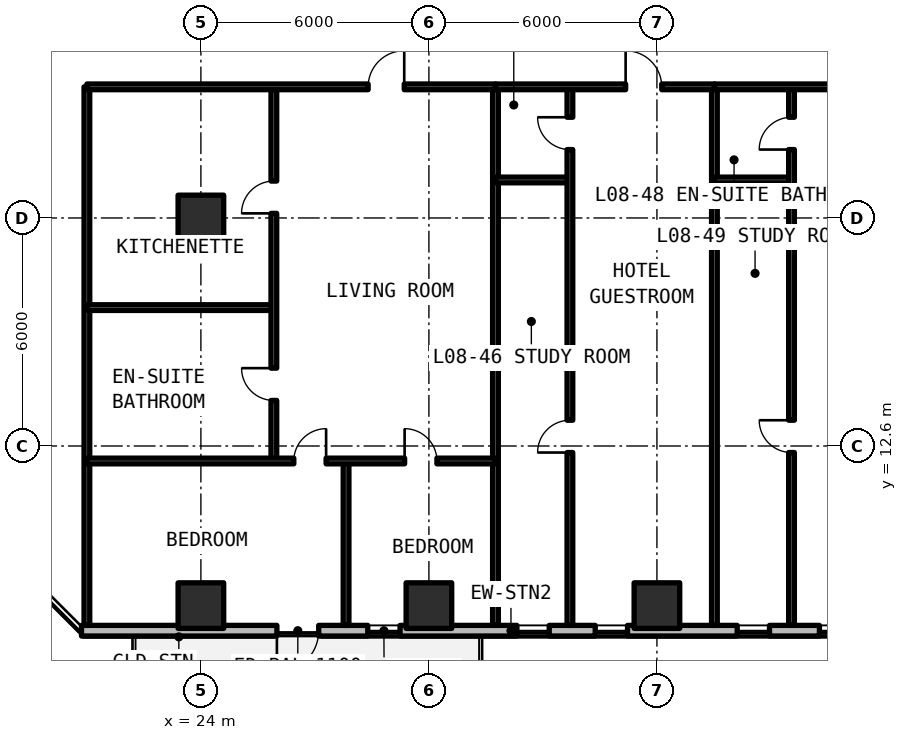
"""IFC4 building model, lengths in metres.
Left out: names, types, materials, properties, quantities, classifications, styles, units other than length and angle.
Written with IfcOpenShell. Run it as: python <this file> out.ifc"""

import sys

from ifc_helpers import new_model, si_unit, direction, frame, frame_2d, origin, origin_2d, place, context, subcontext, project, spatial, rectangle, extrude, element, fill, save


model = new_model("IFC4")
c1 = context("Model", 3, precision=1e-05, world=origin(), true_north=direction((0.0, 1.0)))
c2 = subcontext(c1, "Body", "Model", "MODEL_VIEW")
j1 = project(units=[si_unit("LENGTHUNIT", "METRE"), si_unit("PLANEANGLEUNIT", "RADIAN")], contexts=[c1])
p1 = place(None, origin())
s1 = spatial("IfcSite", under=j1, at=p1, CompositionType="ELEMENT")
p2 = place(p1, origin())
s2 = spatial("IfcBuilding", under=s1, at=p2, CompositionType="ELEMENT")
p3 = place(p2, frame((0.0, 0.0, 32.34)))
s3 = spatial("IfcBuildingStorey", under=s2, at=p3, CompositionType="ELEMENT", Elevation=32.34)
for number, where, z_axis, x_axis in (
    (1, (24.0, 18.6, 0.0), (0.0, 0.0, 1.0), (1.0, 0.0, 0.0)),
    (2, (24.0, 8.4, 0.0), (0.0, 0.0, 1.0), (1.0, 0.0, 0.0)),
    (3, (30.0, 8.4, 0.0), (0.0, 0.0, 1.0), (1.0, 0.0, 0.0)),
    (4, (36.0, 8.4, 0.0), (0.0, 0.0, 1.0), (1.0, 0.0, 0.0)),
):
    element("IfcColumn", number, at=place(p3, frame(where, z_axis=z_axis, x_axis=x_axis)), inside=s3, PredefinedType="COLUMN", context=c2, shape_type="SweptSolid", body=[
        extrude(rectangle(XDim=1.2, YDim=1.2, at=origin_2d()), origin(), (0.0, 0.0, 1.0), 3.3),
    ])
p4 = place(p3, frame((20.858, 7.74, 0.0), z_axis=(0.0, 0.0, 1.0), x_axis=(1.0, 0.0, 0.0)))
e5 = element("IfcWall", 5, at=p4, inside=s3, PredefinedType="SOLIDWALL", context=c2, shape_type="SweptSolid", body=[
    extrude(rectangle(XDim=22.602, YDim=0.28, at=frame_2d((11.301, 0.0))), origin(), (0.0, 0.0, 1.0), 3.08),
])
p5 = place(p4, frame((5.142, 0.0, 0.0)))
e6 = element("IfcOpeningElement", 6, at=p5, cuts=e5, PredefinedType="OPENING", context=c2, shape_type="SweptSolid", body=[
    extrude(rectangle(XDim=1.1, YDim=2.15, at=frame_2d((0.55, 1.075))), frame((0.0, 0.15, 0.0), z_axis=(0.0, -1.0, 0.0), x_axis=(1.0, 0.0, 0.0)), (0.0, 0.0, 1.0), 0.3),
])
p6 = place(p4, frame((7.533, 0.0, 0.78)))
e7 = element("IfcOpeningElement", 7, at=p6, cuts=e5, PredefinedType="OPENING", context=c2, shape_type="SweptSolid", body=[
    extrude(rectangle(XDim=0.85, YDim=1.65, at=frame_2d((0.425, 0.825))), frame((0.0, 0.15, 0.0), z_axis=(0.0, -1.0, 0.0), x_axis=(1.0, 0.0, 0.0)), (0.0, 0.0, 1.0), 0.3),
])
p7 = place(p4, frame((11.458, 0.0, 0.78)))
e8 = element("IfcOpeningElement", 8, at=p7, cuts=e5, PredefinedType="OPENING", context=c2, shape_type="SweptSolid", body=[
    extrude(rectangle(XDim=0.85, YDim=1.65, at=frame_2d((0.425, 0.825))), frame((0.0, 0.15, 0.0), z_axis=(0.0, -1.0, 0.0), x_axis=(1.0, 0.0, 0.0)), (0.0, 0.0, 1.0), 0.3),
])
p8 = place(p4, frame((13.519, 0.0, 0.78)))
e9 = element("IfcOpeningElement", 9, at=p8, cuts=e5, PredefinedType="OPENING", context=c2, shape_type="SweptSolid", body=[
    extrude(rectangle(XDim=0.85, YDim=1.65, at=frame_2d((0.425, 0.825))), frame((0.0, 0.15, 0.0), z_axis=(0.0, -1.0, 0.0), x_axis=(1.0, 0.0, 0.0)), (0.0, 0.0, 1.0), 0.3),
])
p9 = place(p4, frame((17.254, 0.0, 0.78)))
e10 = element("IfcOpeningElement", 10, at=p9, cuts=e5, PredefinedType="OPENING", context=c2, shape_type="SweptSolid", body=[
    extrude(rectangle(XDim=0.85, YDim=1.65, at=frame_2d((0.425, 0.825))), frame((0.0, 0.15, 0.0), z_axis=(0.0, -1.0, 0.0), x_axis=(1.0, 0.0, 0.0)), (0.0, 0.0, 1.0), 0.3),
])
p10 = place(p4, frame((19.418, 0.0, 0.78)))
e11 = element("IfcOpeningElement", 11, at=p10, cuts=e5, PredefinedType="OPENING", context=c2, shape_type="SweptSolid", body=[
    extrude(rectangle(XDim=0.85, YDim=1.65, at=frame_2d((0.425, 0.825))), frame((0.0, 0.15, 0.0), z_axis=(0.0, -1.0, 0.0), x_axis=(1.0, 0.0, 0.0)), (0.0, 0.0, 1.0), 0.3),
])
for number, where, z_axis, x_axis in (
    (12, (21.0, 7.88, 0.0), (0.0, 0.0, 1.0), (0.0, 1.0, 0.0)),
    (13, (31.751, 7.88, 0.0), (0.0, 0.0, 1.0), (0.0, 1.0, 0.0)),
):
    element("IfcWall", number, at=place(p3, frame(where, z_axis=z_axis, x_axis=x_axis)), inside=s3, PredefinedType="SOLIDWALL", context=c2, shape_type="SweptSolid", body=[
        extrude(rectangle(XDim=14.17, YDim=0.15, at=frame_2d((7.085, 0.0))), origin(), (0.0, 0.0, 1.0), 2.35),
    ])
p11 = place(p3, frame((21.0, 16.242, 0.0), z_axis=(0.0, 0.0, 1.0), x_axis=(1.0, 0.0, 0.0)))
e14 = element("IfcWall", 14, at=p11, inside=s3, PredefinedType="PARTITIONING", context=c2, shape_type="SweptSolid", body=[
    extrude(rectangle(XDim=4.92, YDim=0.15, at=frame_2d((2.46, 0.0))), origin(), (0.0, 0.0, 1.0), 2.35),
])
p12 = place(p3, frame((25.92, 12.206, 0.0), z_axis=(0.0, 0.0, 1.0), x_axis=(0.0, 1.0, 0.0)))
e15 = element("IfcWall", 15, at=p12, inside=s3, PredefinedType="PARTITIONING", context=c2, shape_type="SweptSolid", body=[
    extrude(rectangle(XDim=9.844, YDim=0.15, at=frame_2d((4.922, 0.0))), origin(), (0.0, 0.0, 1.0), 2.35),
])
p13 = place(p12, frame((1.593, 0.0, 0.0)))
e16 = element("IfcOpeningElement", 16, at=p13, cuts=e15, PredefinedType="OPENING", context=c2, shape_type="SweptSolid", body=[
    extrude(rectangle(XDim=0.85, YDim=2.1, at=frame_2d((0.425, 1.05))), frame((0.0, 0.085, 0.0), z_axis=(0.0, -1.0, 0.0), x_axis=(1.0, 0.0, 0.0)), (0.0, 0.0, 1.0), 0.17),
])
p14 = place(p12, frame((6.515, 0.0, 0.0)))
e17 = element("IfcOpeningElement", 17, at=p14, cuts=e15, PredefinedType="OPENING", context=c2, shape_type="SweptSolid", body=[
    extrude(rectangle(XDim=0.85, YDim=2.1, at=frame_2d((0.425, 1.05))), frame((0.0, 0.085, 0.0), z_axis=(0.0, -1.0, 0.0), x_axis=(1.0, 0.0, 0.0)), (0.0, 0.0, 1.0), 0.17),
])
p15 = place(p3, frame((27.82, 7.88, 0.0), z_axis=(0.0, 0.0, 1.0), x_axis=(0.0, 1.0, 0.0)))
e18 = element("IfcWall", 18, at=p15, inside=s3, PredefinedType="PARTITIONING", context=c2, shape_type="SweptSolid", body=[
    extrude(rectangle(XDim=4.326, YDim=0.15, at=frame_2d((2.163, 0.0))), origin(), (0.0, 0.0, 1.0), 2.35),
])
p16 = place(p3, frame((21.0, 12.206, 0.0), z_axis=(0.0, 0.0, 1.0), x_axis=(1.0, 0.0, 0.0)))
e19 = element("IfcWall", 19, at=p16, inside=s3, PredefinedType="PARTITIONING", context=c2, shape_type="SweptSolid", body=[
    extrude(rectangle(XDim=10.751, YDim=0.15, at=frame_2d((5.375, 0.0))), origin(), (0.0, 0.0, 1.0), 2.35),
])
p17 = place(p16, frame((5.445, 0.0, 0.0)))
e20 = element("IfcOpeningElement", 20, at=p17, cuts=e19, PredefinedType="OPENING", context=c2, shape_type="SweptSolid", body=[
    extrude(rectangle(XDim=0.85, YDim=2.1, at=frame_2d((0.425, 1.05))), frame((0.0, 0.085, 0.0), z_axis=(0.0, -1.0, 0.0), x_axis=(1.0, 0.0, 0.0)), (0.0, 0.0, 1.0), 0.17),
])
p18 = place(p16, frame((8.361, 0.0, 0.0)))
e21 = element("IfcOpeningElement", 21, at=p18, cuts=e19, PredefinedType="OPENING", context=c2, shape_type="SweptSolid", body=[
    extrude(rectangle(XDim=0.85, YDim=2.1, at=frame_2d((0.425, 1.05))), frame((0.0, 0.085, 0.0), z_axis=(0.0, -1.0, 0.0), x_axis=(1.0, 0.0, 0.0)), (0.0, 0.0, 1.0), 0.17),
])
p19 = place(p3, frame((21.0, 22.05, 0.0), z_axis=(0.0, 0.0, 1.0), x_axis=(1.0, 0.0, 0.0)))
e22 = element("IfcWall", 22, at=p19, inside=s3, PredefinedType="SOLIDWALL", context=c2, shape_type="SweptSolid", body=[
    extrude(rectangle(XDim=10.751, YDim=0.15, at=frame_2d((5.375, 0.0))), origin(), (0.0, 0.0, 1.0), 2.35),
])
p20 = place(p19, frame((7.401, 0.0, 0.0)))
e23 = element("IfcOpeningElement", 23, at=p20, cuts=e22, PredefinedType="OPENING", context=c2, shape_type="SweptSolid", body=[
    extrude(rectangle(XDim=0.95, YDim=2.15, at=frame_2d((0.475, 1.075))), frame((0.0, 0.085, 0.0), z_axis=(0.0, -1.0, 0.0), x_axis=(1.0, 0.0, 0.0)), (0.0, 0.0, 1.0), 0.17),
])
p21 = place(p3, frame((37.513, 7.88, 0.0), z_axis=(0.0, 0.0, 1.0), x_axis=(0.0, 1.0, 0.0)))
e24 = element("IfcWall", 24, at=p21, inside=s3, PredefinedType="SOLIDWALL", context=c2, shape_type="SweptSolid", body=[
    extrude(rectangle(XDim=14.17, YDim=0.15, at=frame_2d((7.085, 0.0))), origin(), (0.0, 0.0, 1.0), 2.35),
])
p22 = place(p3, frame((31.751, 19.6, 0.0), z_axis=(0.0, 0.0, 1.0), x_axis=(1.0, 0.0, 0.0)))
e25 = element("IfcWall", 25, at=p22, inside=s3, PredefinedType="PARTITIONING", context=c2, shape_type="SweptSolid", body=[
    extrude(rectangle(XDim=1.959, YDim=0.15, at=frame_2d((0.979, 0.0))), origin(), (0.0, 0.0, 1.0), 2.35),
])
p23 = place(p3, frame((33.71, 7.88, 0.0), z_axis=(0.0, 0.0, 1.0), x_axis=(0.0, 1.0, 0.0)))
e26 = element("IfcWall", 26, at=p23, inside=s3, PredefinedType="PARTITIONING", context=c2, shape_type="SweptSolid", body=[
    extrude(rectangle(XDim=14.17, YDim=0.15, at=frame_2d((7.085, 0.0))), origin(), (0.0, 0.0, 1.0), 2.35),
])
p24 = place(p23, frame((4.548, 0.0, 0.0)))
e27 = element("IfcOpeningElement", 27, at=p24, cuts=e26, PredefinedType="OPENING", context=c2, shape_type="SweptSolid", body=[
    extrude(rectangle(XDim=0.85, YDim=2.1, at=frame_2d((0.425, 1.05))), frame((0.0, 0.085, 0.0), z_axis=(0.0, -1.0, 0.0), x_axis=(1.0, 0.0, 0.0)), (0.0, 0.0, 1.0), 0.17),
])
p25 = place(p23, frame((12.52, 0.0, 0.0)))
e28 = element("IfcOpeningElement", 28, at=p25, cuts=e26, PredefinedType="OPENING", context=c2, shape_type="SweptSolid", body=[
    extrude(rectangle(XDim=0.85, YDim=2.1, at=frame_2d((0.425, 1.05))), frame((0.0, 0.085, 0.0), z_axis=(0.0, -1.0, 0.0), x_axis=(1.0, 0.0, 0.0)), (0.0, 0.0, 1.0), 0.17),
])
p26 = place(p3, frame((31.751, 22.05, 0.0), z_axis=(0.0, 0.0, 1.0), x_axis=(1.0, 0.0, 0.0)))
e29 = element("IfcWall", 29, at=p26, inside=s3, PredefinedType="SOLIDWALL", context=c2, shape_type="SweptSolid", body=[
    extrude(rectangle(XDim=5.761, YDim=0.15, at=frame_2d((2.881, 0.0))), origin(), (0.0, 0.0, 1.0), 2.35),
])
p27 = place(p26, frame((3.425, 0.0, 0.0)))
e30 = element("IfcOpeningElement", 30, at=p27, cuts=e29, PredefinedType="OPENING", context=c2, shape_type="SweptSolid", body=[
    extrude(rectangle(XDim=0.95, YDim=2.15, at=frame_2d((0.475, 1.075))), frame((0.0, 0.085, 0.0), z_axis=(0.0, -1.0, 0.0), x_axis=(1.0, 0.0, 0.0)), (0.0, 0.0, 1.0), 0.17),
])
p28 = place(p3, frame((37.513, 19.6, 0.0), z_axis=(0.0, 0.0, 1.0), x_axis=(1.0, 0.0, 0.0)))
e31 = element("IfcWall", 31, at=p28, inside=s3, PredefinedType="PARTITIONING", context=c2, shape_type="SweptSolid", body=[
    extrude(rectangle(XDim=2.029, YDim=0.15, at=frame_2d((1.014, 0.0))), origin(), (0.0, 0.0, 1.0), 2.35),
])
p29 = place(p3, frame((39.542, 7.88, 0.0), z_axis=(0.0, 0.0, 1.0), x_axis=(0.0, 1.0, 0.0)))
e32 = element("IfcWall", 32, at=p29, inside=s3, PredefinedType="PARTITIONING", context=c2, shape_type="SweptSolid", body=[
    extrude(rectangle(XDim=14.17, YDim=0.15, at=frame_2d((7.085, 0.0))), origin(), (0.0, 0.0, 1.0), 2.35),
])
p30 = place(p29, frame((4.548, 0.0, 0.0)))
e33 = element("IfcOpeningElement", 33, at=p30, cuts=e32, PredefinedType="OPENING", context=c2, shape_type="SweptSolid", body=[
    extrude(rectangle(XDim=0.85, YDim=2.1, at=frame_2d((0.425, 1.05))), frame((0.0, 0.085, 0.0), z_axis=(0.0, -1.0, 0.0), x_axis=(1.0, 0.0, 0.0)), (0.0, 0.0, 1.0), 0.17),
])
p31 = place(p29, frame((12.52, 0.0, 0.0)))
e34 = element("IfcOpeningElement", 34, at=p31, cuts=e32, PredefinedType="OPENING", context=c2, shape_type="SweptSolid", body=[
    extrude(rectangle(XDim=0.85, YDim=2.1, at=frame_2d((0.425, 1.05))), frame((0.0, 0.085, 0.0), z_axis=(0.0, -1.0, 0.0), x_axis=(1.0, 0.0, 0.0)), (0.0, 0.0, 1.0), 0.17),
])
p32 = place(p3, frame((37.513, 22.05, 0.0), z_axis=(0.0, 0.0, 1.0), x_axis=(1.0, 0.0, 0.0)))
e35 = element("IfcWall", 35, at=p32, inside=s3, PredefinedType="SOLIDWALL", context=c2, shape_type="SweptSolid", body=[
    extrude(rectangle(XDim=5.967, YDim=0.15, at=frame_2d((2.984, 0.0))), origin(), (0.0, 0.0, 1.0), 2.35),
])
p33 = place(p32, frame((3.563, 0.0, 0.0)))
e36 = element("IfcOpeningElement", 36, at=p33, cuts=e35, PredefinedType="OPENING", context=c2, shape_type="SweptSolid", body=[
    extrude(rectangle(XDim=0.95, YDim=2.15, at=frame_2d((0.475, 1.075))), frame((0.0, 0.085, 0.0), z_axis=(0.0, -1.0, 0.0), x_axis=(1.0, 0.0, 0.0)), (0.0, 0.0, 1.0), 0.17),
])
p34 = place(p5, frame((1.1, 0.0, 0.0), z_axis=(0.0, 0.0, 1.0), x_axis=(-1.0, 0.0, 0.0)))
e37 = element("IfcDoor", 37, at=p34, inside=s3, OperationType="SINGLE_SWING_RIGHT", PredefinedType="DOOR", context=c2, shape_type="SweptSolid", body=[
    extrude(rectangle(XDim=1.1, YDim=2.15, at=frame_2d((0.55, 1.075))), frame((0.0, 0.025, 0.0), z_axis=(0.0, -1.0, 0.0), x_axis=(1.0, 0.0, 0.0)), (0.0, 0.0, 1.0), 0.05),
])
fill(e6, e37)
p35 = place(p6, origin())
e38 = element("IfcWindow", 38, at=p35, inside=s3, PartitioningType="SINGLE_PANEL", PredefinedType="WINDOW", context=c2, shape_type="SweptSolid", body=[
    extrude(rectangle(XDim=0.85, YDim=1.65, at=frame_2d((0.425, 0.825))), frame((0.0, 0.03, 0.0), z_axis=(0.0, -1.0, 0.0), x_axis=(1.0, 0.0, 0.0)), (0.0, 0.0, 1.0), 0.06),
])
fill(e7, e38)
p36 = place(p7, origin())
e39 = element("IfcWindow", 39, at=p36, inside=s3, PartitioningType="SINGLE_PANEL", PredefinedType="WINDOW", context=c2, shape_type="SweptSolid", body=[
    extrude(rectangle(XDim=0.85, YDim=1.65, at=frame_2d((0.425, 0.825))), frame((0.0, 0.03, 0.0), z_axis=(0.0, -1.0, 0.0), x_axis=(1.0, 0.0, 0.0)), (0.0, 0.0, 1.0), 0.06),
])
fill(e8, e39)
p37 = place(p8, origin())
e40 = element("IfcWindow", 40, at=p37, inside=s3, PartitioningType="SINGLE_PANEL", PredefinedType="WINDOW", context=c2, shape_type="SweptSolid", body=[
    extrude(rectangle(XDim=0.85, YDim=1.65, at=frame_2d((0.425, 0.825))), frame((0.0, 0.03, 0.0), z_axis=(0.0, -1.0, 0.0), x_axis=(1.0, 0.0, 0.0)), (0.0, 0.0, 1.0), 0.06),
])
fill(e9, e40)
p38 = place(p9, origin())
e41 = element("IfcWindow", 41, at=p38, inside=s3, PartitioningType="SINGLE_PANEL", PredefinedType="WINDOW", context=c2, shape_type="SweptSolid", body=[
    extrude(rectangle(XDim=0.85, YDim=1.65, at=frame_2d((0.425, 0.825))), frame((0.0, 0.03, 0.0), z_axis=(0.0, -1.0, 0.0), x_axis=(1.0, 0.0, 0.0)), (0.0, 0.0, 1.0), 0.06),
])
fill(e10, e41)
p39 = place(p10, origin())
e42 = element("IfcWindow", 42, at=p39, inside=s3, PartitioningType="SINGLE_PANEL", PredefinedType="WINDOW", context=c2, shape_type="SweptSolid", body=[
    extrude(rectangle(XDim=0.85, YDim=1.65, at=frame_2d((0.425, 0.825))), frame((0.0, 0.03, 0.0), z_axis=(0.0, -1.0, 0.0), x_axis=(1.0, 0.0, 0.0)), (0.0, 0.0, 1.0), 0.06),
])
fill(e11, e42)
p40 = place(p13, origin())
e43 = element("IfcDoor", 43, at=p40, inside=s3, OperationType="SINGLE_SWING_RIGHT", PredefinedType="DOOR", context=c2, shape_type="SweptSolid", body=[
    extrude(rectangle(XDim=0.85, YDim=2.1, at=frame_2d((0.425, 1.05))), frame((0.0, 0.025, 0.0), z_axis=(0.0, -1.0, 0.0), x_axis=(1.0, 0.0, 0.0)), (0.0, 0.0, 1.0), 0.05),
])
fill(e16, e43)
p41 = place(p14, origin())
e44 = element("IfcDoor", 44, at=p41, inside=s3, OperationType="SINGLE_SWING_LEFT", PredefinedType="DOOR", context=c2, shape_type="SweptSolid", body=[
    extrude(rectangle(XDim=0.85, YDim=2.1, at=frame_2d((0.425, 1.05))), frame((0.0, 0.025, 0.0), z_axis=(0.0, -1.0, 0.0), x_axis=(1.0, 0.0, 0.0)), (0.0, 0.0, 1.0), 0.05),
])
fill(e17, e44)
p42 = place(p17, origin())
e45 = element("IfcDoor", 45, at=p42, inside=s3, OperationType="SINGLE_SWING_RIGHT", PredefinedType="DOOR", context=c2, shape_type="SweptSolid", body=[
    extrude(rectangle(XDim=0.85, YDim=2.1, at=frame_2d((0.425, 1.05))), frame((0.0, 0.025, 0.0), z_axis=(0.0, -1.0, 0.0), x_axis=(1.0, 0.0, 0.0)), (0.0, 0.0, 1.0), 0.05),
])
fill(e20, e45)
p43 = place(p18, origin())
e46 = element("IfcDoor", 46, at=p43, inside=s3, OperationType="SINGLE_SWING_LEFT", PredefinedType="DOOR", context=c2, shape_type="SweptSolid", body=[
    extrude(rectangle(XDim=0.85, YDim=2.1, at=frame_2d((0.425, 1.05))), frame((0.0, 0.025, 0.0), z_axis=(0.0, -1.0, 0.0), x_axis=(1.0, 0.0, 0.0)), (0.0, 0.0, 1.0), 0.05),
])
fill(e21, e46)
p44 = place(p20, origin())
e47 = element("IfcDoor", 47, at=p44, inside=s3, OperationType="SINGLE_SWING_RIGHT", PredefinedType="DOOR", context=c2, shape_type="SweptSolid", body=[
    extrude(rectangle(XDim=0.95, YDim=2.15, at=frame_2d((0.475, 1.075))), frame((0.0, 0.025, 0.0), z_axis=(0.0, -1.0, 0.0), x_axis=(1.0, 0.0, 0.0)), (0.0, 0.0, 1.0), 0.05),
])
fill(e23, e47)
p45 = place(p24, origin())
e48 = element("IfcDoor", 48, at=p45, inside=s3, OperationType="SINGLE_SWING_LEFT", PredefinedType="DOOR", context=c2, shape_type="SweptSolid", body=[
    extrude(rectangle(XDim=0.85, YDim=2.1, at=frame_2d((0.425, 1.05))), frame((0.0, 0.025, 0.0), z_axis=(0.0, -1.0, 0.0), x_axis=(1.0, 0.0, 0.0)), (0.0, 0.0, 1.0), 0.05),
])
fill(e27, e48)
p46 = place(p25, origin())
e49 = element("IfcDoor", 49, at=p46, inside=s3, OperationType="SINGLE_SWING_RIGHT", PredefinedType="DOOR", context=c2, shape_type="SweptSolid", body=[
    extrude(rectangle(XDim=0.85, YDim=2.1, at=frame_2d((0.425, 1.05))), frame((0.0, 0.025, 0.0), z_axis=(0.0, -1.0, 0.0), x_axis=(1.0, 0.0, 0.0)), (0.0, 0.0, 1.0), 0.05),
])
fill(e28, e49)
p47 = place(p27, origin())
e50 = element("IfcDoor", 50, at=p47, inside=s3, OperationType="SINGLE_SWING_LEFT", PredefinedType="DOOR", context=c2, shape_type="SweptSolid", body=[
    extrude(rectangle(XDim=0.95, YDim=2.15, at=frame_2d((0.475, 1.075))), frame((0.0, 0.025, 0.0), z_axis=(0.0, -1.0, 0.0), x_axis=(1.0, 0.0, 0.0)), (0.0, 0.0, 1.0), 0.05),
])
fill(e30, e50)
p48 = place(p30, origin())
e51 = element("IfcDoor", 51, at=p48, inside=s3, OperationType="SINGLE_SWING_RIGHT", PredefinedType="DOOR", context=c2, shape_type="SweptSolid", body=[
    extrude(rectangle(XDim=0.85, YDim=2.1, at=frame_2d((0.425, 1.05))), frame((0.0, 0.025, 0.0), z_axis=(0.0, -1.0, 0.0), x_axis=(1.0, 0.0, 0.0)), (0.0, 0.0, 1.0), 0.05),
])
fill(e33, e51)
p49 = place(p31, origin())
e52 = element("IfcDoor", 52, at=p49, inside=s3, OperationType="SINGLE_SWING_LEFT", PredefinedType="DOOR", context=c2, shape_type="SweptSolid", body=[
    extrude(rectangle(XDim=0.85, YDim=2.1, at=frame_2d((0.425, 1.05))), frame((0.0, 0.025, 0.0), z_axis=(0.0, -1.0, 0.0), x_axis=(1.0, 0.0, 0.0)), (0.0, 0.0, 1.0), 0.05),
])
fill(e34, e52)
save(model, sys.argv[1])
